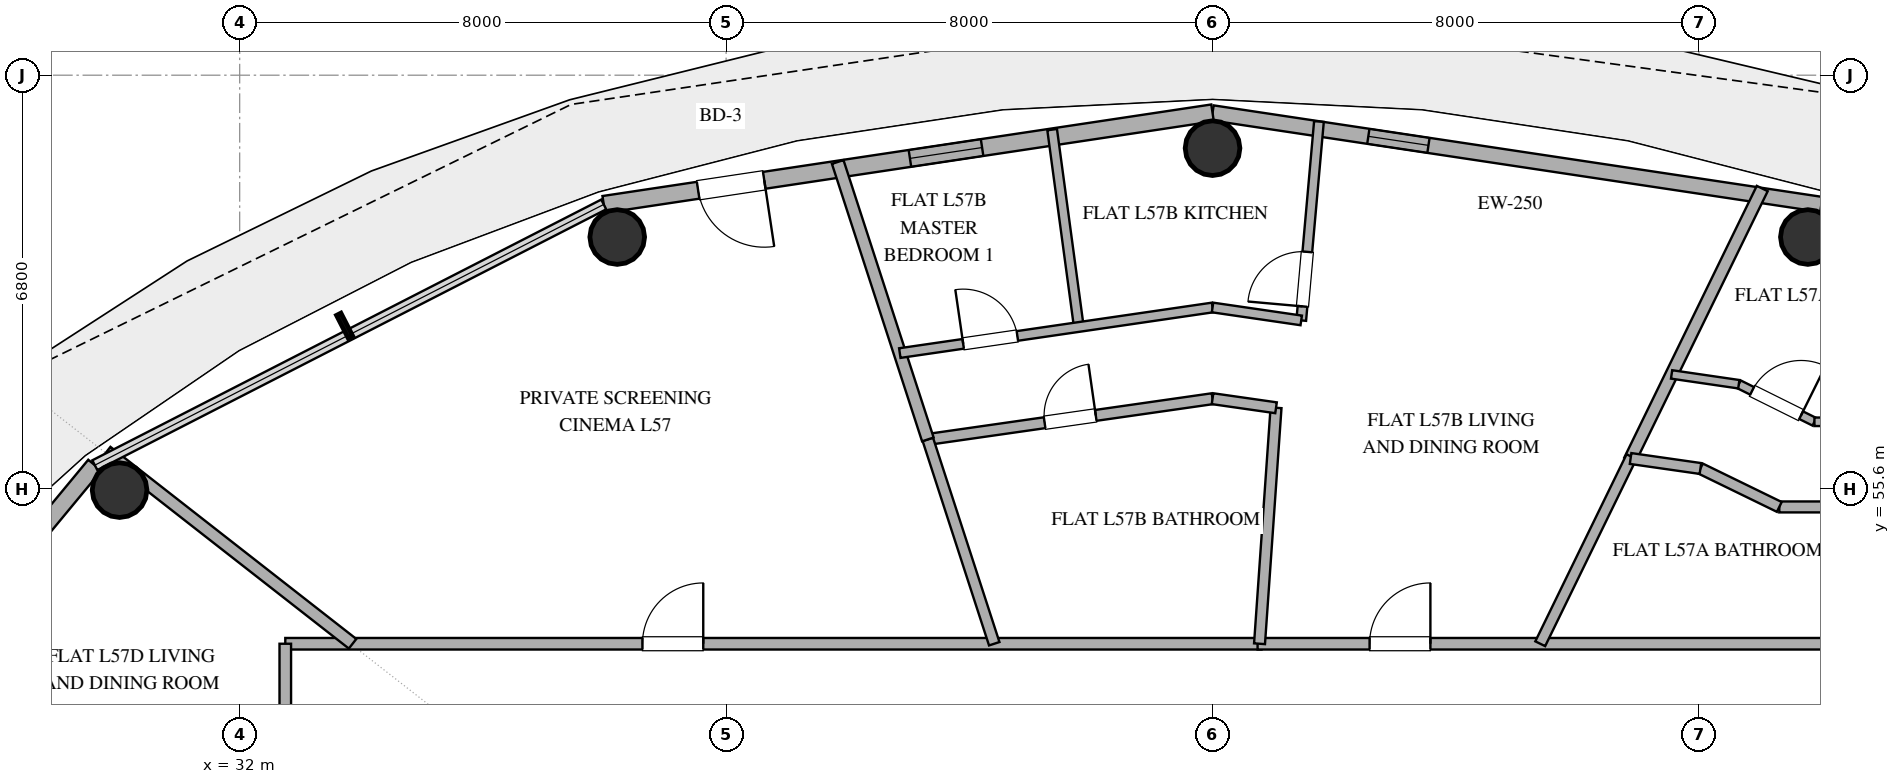
"""IFC4 building model, lengths in metres.
Left out: names, types, materials, properties, quantities, classifications, styles, units other than length and angle.
Written with IfcOpenShell. Run it as: python <this file> out.ifc"""

import sys

from ifc_helpers import new_model, si_unit, direction, frame, frame_2d, origin, origin_2d, place, context, subcontext, project, spatial, rectangle, hollow_circle, extrude, element, fill, save


model = new_model("IFC4")
c1 = context("Model", 3, precision=1e-05, world=origin(), true_north=direction((0.0, 1.0)))
c2 = subcontext(c1, "Body", "Model", "MODEL_VIEW")
j1 = project(units=[si_unit("LENGTHUNIT", "METRE"), si_unit("PLANEANGLEUNIT", "RADIAN")], contexts=[c1])
p1 = place(None, origin())
s1 = spatial("IfcSite", under=j1, at=p1, CompositionType="ELEMENT")
p2 = place(p1, origin())
s2 = spatial("IfcBuilding", under=s1, at=p2, CompositionType="ELEMENT")
p3 = place(p2, frame((0.0, 0.0, 224.4)))
s3 = spatial("IfcBuildingStorey", under=s2, at=p3, CompositionType="ELEMENT", Elevation=224.4)
for number, where, z_axis, x_axis in (
    (1, (57.791, 59.739, 0.0), (0.0, 0.0, 1.0), (1.0, 0.0, 0.0)),
    (2, (48.0, 61.2, 0.0), (0.0, 0.0, 1.0), (1.0, 0.0, 0.0)),
    (3, (38.209, 59.739, 0.0), (0.0, 0.0, 1.0), (1.0, 0.0, 0.0)),
    (4, (30.025, 55.576, 0.0), (0.0, 0.0, 1.0), (1.0, 0.0, 0.0)),
):
    element("IfcColumn", number, at=place(p3, frame(where, z_axis=z_axis, x_axis=x_axis)), inside=s3, PredefinedType="COLUMN", context=c2, shape_type="SweptSolid", body=[
        extrude(hollow_circle(Radius=0.45, WallThickness=0.025, at=origin_2d()), origin(), (0.0, 0.0, 1.0), 3.36),
    ])
p4 = place(p3, frame((66.383, 55.987, 0.0), z_axis=(0.0, 0.0, 1.0), x_axis=(-0.890007394051, 0.455946091699, 0.0)))
e5 = element("IfcWall", 5, at=p4, inside=s3, PredefinedType="SOLIDWALL", context=c2, shape_type="SweptSolid", body=[
    extrude(rectangle(XDim=9.404, YDim=0.28, at=frame_2d((4.702, 0.0))), origin(), (0.0, 0.0, 1.0), 3.36),
])
p5 = place(p4, frame((1.661, 0.0, 0.85)))
e6 = element("IfcOpeningElement", 6, at=p5, cuts=e5, PredefinedType="OPENING", context=c2, shape_type="SweptSolid", body=[
    extrude(rectangle(XDim=1.0, YDim=1.8, at=frame_2d((0.5, 0.9))), frame((0.0, 0.15, 0.0), z_axis=(0.0, -1.0, 0.0), x_axis=(1.0, 0.0, 0.0)), (0.0, 0.0, 1.0), 0.3),
])
p6 = place(p4, frame((3.898, 0.0, 0.85)))
e7 = element("IfcOpeningElement", 7, at=p6, cuts=e5, PredefinedType="OPENING", context=c2, shape_type="SweptSolid", body=[
    extrude(rectangle(XDim=1.35, YDim=1.8, at=frame_2d((0.675, 0.9))), frame((0.0, 0.15, 0.0), z_axis=(0.0, -1.0, 0.0), x_axis=(1.0, 0.0, 0.0)), (0.0, 0.0, 1.0), 0.3),
])
p7 = place(p4, frame((6.578, 0.0, 0.85)))
e8 = element("IfcOpeningElement", 8, at=p7, cuts=e5, PredefinedType="OPENING", context=c2, shape_type="SweptSolid", body=[
    extrude(rectangle(XDim=1.2, YDim=1.8, at=frame_2d((0.6, 0.9))), frame((0.0, 0.15, 0.0), z_axis=(0.0, -1.0, 0.0), x_axis=(1.0, 0.0, 0.0)), (0.0, 0.0, 1.0), 0.3),
])
p8 = place(p3, frame((58.013, 60.274, 0.0), z_axis=(0.0, 0.0, 1.0), x_axis=(-0.988882522213, 0.148698881169, 0.0)))
e9 = element("IfcWall", 9, at=p8, inside=s3, PredefinedType="SOLIDWALL", context=c2, shape_type="SweptSolid", body=[
    extrude(rectangle(XDim=10.125, YDim=0.25, at=frame_2d((5.062, 0.0))), origin(), (0.0, 0.0, 1.0), 3.36),
])
p9 = place(p8, frame((6.534, 0.0, 1.42)))
e10 = element("IfcOpeningElement", 10, at=p9, cuts=e9, PredefinedType="OPENING", context=c2, shape_type="SweptSolid", body=[
    extrude(rectangle(XDim=1.0, YDim=1.05, at=frame_2d((0.5, 0.525))), frame((0.0, 0.135, 0.0), z_axis=(0.0, -1.0, 0.0), x_axis=(1.0, 0.0, 0.0)), (0.0, 0.0, 1.0), 0.27),
])
p10 = place(p3, frame((48.0, 61.78, 0.0), z_axis=(0.0, 0.0, 1.0), x_axis=(-0.988882522213, -0.148698881169, 0.0)))
e11 = element("IfcWall", 11, at=p10, inside=s3, PredefinedType="SOLIDWALL", context=c2, shape_type="SweptSolid", body=[
    extrude(rectangle(XDim=10.125, YDim=0.28, at=frame_2d((5.062, 0.0))), origin(), (0.0, 0.0, 1.0), 3.36),
])
p11 = place(p10, frame((3.833, 0.0, 0.85)))
e12 = element("IfcOpeningElement", 12, at=p11, cuts=e11, PredefinedType="OPENING", context=c2, shape_type="SweptSolid", body=[
    extrude(rectangle(XDim=1.2, YDim=1.8, at=frame_2d((0.6, 0.9))), frame((0.0, 0.15, 0.0), z_axis=(0.0, -1.0, 0.0), x_axis=(1.0, 0.0, 0.0)), (0.0, 0.0, 1.0), 0.3),
])
p12 = place(p10, frame((7.456, 0.0, 0.0)))
e13 = element("IfcOpeningElement", 13, at=p12, cuts=e11, PredefinedType="OPENING", context=c2, shape_type="SweptSolid", body=[
    extrude(rectangle(XDim=1.1, YDim=2.25, at=frame_2d((0.55, 1.125))), frame((0.0, 0.15, 0.0), z_axis=(0.0, -1.0, 0.0), x_axis=(1.0, 0.0, 0.0)), (0.0, 0.0, 1.0), 0.3),
])
p13 = place(p3, frame((29.617, 55.987, 0.0), z_axis=(0.0, 0.0, 1.0), x_axis=(-0.63761509934, -0.770355103243, 0.0)))
e14 = element("IfcWall", 14, at=p13, inside=s3, PredefinedType="SOLIDWALL", context=c2, shape_type="SweptSolid", body=[
    extrude(rectangle(XDim=8.33, YDim=0.28, at=frame_2d((4.165, 0.0))), origin(), (0.0, 0.0, 1.0), 3.36),
])
p14 = place(p13, frame((2.533, 0.0, 0.85)))
e15 = element("IfcOpeningElement", 15, at=p14, cuts=e14, PredefinedType="OPENING", context=c2, shape_type="SweptSolid", body=[
    extrude(rectangle(XDim=2.1, YDim=2.2, at=frame_2d((1.05, 1.1))), frame((0.0, 0.15, 0.0), z_axis=(0.0, -1.0, 0.0), x_axis=(1.0, 0.0, 0.0)), (0.0, 0.0, 1.0), 0.3),
])
p15 = place(p3, frame((32.75, 53.05, 0.0), z_axis=(0.0, 0.0, 1.0), x_axis=(1.0, 0.0, 0.0)))
e16 = element("IfcWall", 16, at=p15, inside=s3, PredefinedType="PARTITIONING", context=c2, shape_type="SweptSolid", body=[
    extrude(rectangle(XDim=16.055, YDim=0.19, at=frame_2d((8.027, 0.0))), origin(), (0.0, 0.0, 1.0), 2.72),
])
p16 = place(p15, frame((5.874, 0.0, 0.0)))
e17 = element("IfcOpeningElement", 17, at=p16, cuts=e16, PredefinedType="OPENING", context=c2, shape_type="SweptSolid", body=[
    extrude(rectangle(XDim=1.0, YDim=2.2, at=frame_2d((0.5, 1.1))), frame((0.0, 0.105, 0.0), z_axis=(0.0, -1.0, 0.0), x_axis=(1.0, 0.0, 0.0)), (0.0, 0.0, 1.0), 0.21),
])
p17 = place(p3, frame((48.74, 53.05, 0.0), z_axis=(0.0, 0.0, 1.0), x_axis=(1.0, 0.0, 0.0)))
e18 = element("IfcWall", 18, at=p17, inside=s3, PredefinedType="PARTITIONING", context=c2, shape_type="SweptSolid", body=[
    extrude(rectangle(XDim=14.51, YDim=0.19, at=frame_2d((7.255, 0.0))), origin(), (0.0, 0.0, 1.0), 2.72),
])
p18 = place(p17, frame((1.842, 0.0, 0.0)))
e19 = element("IfcOpeningElement", 19, at=p18, cuts=e18, PredefinedType="OPENING", context=c2, shape_type="SweptSolid", body=[
    extrude(rectangle(XDim=1.0, YDim=2.2, at=frame_2d((0.5, 1.1))), frame((0.0, 0.105, 0.0), z_axis=(0.0, -1.0, 0.0), x_axis=(1.0, 0.0, 0.0)), (0.0, 0.0, 1.0), 0.21),
])
p19 = place(p3, frame((32.75, 43.356, 0.0), z_axis=(0.0, 0.0, 1.0), x_axis=(0.0, 1.0, 0.0)))
e20 = element("IfcWall", 20, at=p19, inside=s3, PredefinedType="PARTITIONING", context=c2, shape_type="SweptSolid", body=[
    extrude(rectangle(XDim=9.694, YDim=0.19, at=frame_2d((4.847, 0.0))), origin(), (0.0, 0.0, 1.0), 2.72),
])
p20 = place(p19, frame((5.983, 0.0, 0.0)))
e21 = element("IfcOpeningElement", 21, at=p20, cuts=e20, PredefinedType="OPENING", context=c2, shape_type="SweptSolid", body=[
    extrude(rectangle(XDim=1.0, YDim=2.2, at=frame_2d((0.5, 1.1))), frame((0.0, 0.105, 0.0), z_axis=(0.0, -1.0, 0.0), x_axis=(1.0, 0.0, 0.0)), (0.0, 0.0, 1.0), 0.21),
])
p21 = place(p3, frame((29.813, 56.209, 0.0), z_axis=(0.0, 0.0, 1.0), x_axis=(0.788043849094, -0.615619112687, 0.0)))
e22 = element("IfcWall", 22, at=p21, inside=s3, PredefinedType="PARTITIONING", context=c2, shape_type="SweptSolid", body=[
    extrude(rectangle(XDim=5.131, YDim=0.2, at=frame_2d((2.566, 0.0))), origin(), (0.0, 0.0, 1.0), 2.72),
])
p22 = place(p3, frame((43.318, 56.41, 0.0), z_axis=(0.0, 0.0, 1.0), x_axis=(0.989918499483, 0.141638145927, 0.0)))
e23 = element("IfcWall", 23, at=p22, inside=s3, PredefinedType="PLUMBINGWALL", context=c2, shape_type="SweptSolid", body=[
    extrude(rectangle(XDim=4.73, YDim=0.18, at=frame_2d((2.365, 0.0))), origin(), (0.0, 0.0, 1.0), 2.72),
])
p23 = place(p22, frame((1.94, 0.0, 0.0)))
e24 = element("IfcOpeningElement", 24, at=p23, cuts=e23, PredefinedType="OPENING", context=c2, shape_type="SweptSolid", body=[
    extrude(rectangle(XDim=0.85, YDim=2.1, at=frame_2d((0.425, 1.05))), frame((0.0, 0.1, 0.0), z_axis=(0.0, -1.0, 0.0), x_axis=(1.0, 0.0, 0.0)), (0.0, 0.0, 1.0), 0.2),
])
p24 = place(p3, frame((49.044, 56.931, 0.0), z_axis=(0.0, 0.0, 1.0), x_axis=(-0.0697885329, -0.997561807948, 0.0)))
e25 = element("IfcWall", 25, at=p24, inside=s3, PredefinedType="PLUMBINGWALL", context=c2, shape_type="SweptSolid", body=[
    extrude(rectangle(XDim=3.89, YDim=0.18, at=frame_2d((1.945, 0.0))), origin(), (0.0, 0.0, 1.0), 2.72),
])
p25 = place(p3, frame((44.41, 53.05, 0.0), z_axis=(0.0, 0.0, 1.0), x_axis=(-0.309025133622, 0.951053871655, 0.0)))
e26 = element("IfcWall", 26, at=p25, inside=s3, PredefinedType="PLUMBINGWALL", context=c2, shape_type="SweptSolid", body=[
    extrude(rectangle(XDim=3.533, YDim=0.18, at=frame_2d((1.767, 0.0))), origin(), (0.0, 0.0, 1.0), 2.72),
])
p26 = place(p3, frame((57.041, 60.536, 0.0), z_axis=(0.0, 0.0, 1.0), x_axis=(-0.438355931311, -0.898801467224, 0.0)))
e27 = element("IfcWall", 27, at=p26, inside=s3, PredefinedType="PARTITIONING", context=c2, shape_type="SweptSolid", body=[
    extrude(rectangle(XDim=4.974, YDim=0.2, at=frame_2d((2.487, 0.0))), origin(), (0.0, 0.0, 1.0), 2.72),
])
p27 = place(p3, frame((54.89, 56.127, 0.0), z_axis=(0.0, 0.0, 1.0), x_axis=(-0.438347749683, -0.898805457453, 0.0)))
e28 = element("IfcWall", 28, at=p27, inside=s3, PredefinedType="PLUMBINGWALL", context=c2, shape_type="SweptSolid", body=[
    extrude(rectangle(XDim=3.423, YDim=0.18, at=frame_2d((1.711, 0.0))), origin(), (0.0, 0.0, 1.0), 2.72),
])
p28 = place(p3, frame((43.318, 56.41, 0.0), z_axis=(0.0, 0.0, 1.0), x_axis=(-0.309012424199, 0.951058001223, 0.0)))
e29 = element("IfcWall", 29, at=p28, inside=s3, PredefinedType="PARTITIONING", context=c2, shape_type="SweptSolid", body=[
    extrude(rectangle(XDim=4.797, YDim=0.2, at=frame_2d((2.399, 0.0))), origin(), (0.0, 0.0, 1.0), 2.72),
])
p29 = place(p3, frame((49.458, 58.367, 0.0), z_axis=(0.0, 0.0, 1.0), x_axis=(0.088772560689, 0.996051922577, 0.0)))
e30 = element("IfcWall", 30, at=p29, inside=s3, PredefinedType="PLUMBINGWALL", context=c2, shape_type="SweptSolid", body=[
    extrude(rectangle(XDim=3.284, YDim=0.16, at=frame_2d((1.642, 0.0))), origin(), (0.0, 0.0, 1.0), 2.72),
])
p30 = place(p29, frame((0.232, 0.0, 0.0)))
e31 = element("IfcOpeningElement", 31, at=p30, cuts=e30, PredefinedType="OPENING", context=c2, shape_type="SweptSolid", body=[
    extrude(rectangle(XDim=0.9, YDim=2.1, at=frame_2d((0.45, 1.05))), frame((0.0, 0.09, 0.0), z_axis=(0.0, -1.0, 0.0), x_axis=(1.0, 0.0, 0.0)), (0.0, 0.0, 1.0), 0.18),
])
p31 = place(p3, frame((45.801, 58.259, 0.0), z_axis=(0.0, 0.0, 1.0), x_axis=(-0.13403859548, 0.990976112185, 0.0)))
e32 = element("IfcWall", 32, at=p31, inside=s3, PredefinedType="PLUMBINGWALL", context=c2, shape_type="SweptSolid", body=[
    extrude(rectangle(XDim=3.275, YDim=0.16, at=frame_2d((1.637, 0.0))), origin(), (0.0, 0.0, 1.0), 2.72),
])
p32 = place(p3, frame((42.856, 57.83, 0.0), z_axis=(0.0, 0.0, 1.0), x_axis=(0.989542480506, 0.144241739018, 0.0)))
e33 = element("IfcWall", 33, at=p32, inside=s3, PredefinedType="PLUMBINGWALL", context=c2, shape_type="SweptSolid", body=[
    extrude(rectangle(XDim=5.198, YDim=0.16, at=frame_2d((2.599, 0.0))), origin(), (0.0, 0.0, 1.0), 2.72),
])
p33 = place(p32, frame((1.054, 0.0, 0.0)))
e34 = element("IfcOpeningElement", 34, at=p33, cuts=e33, PredefinedType="OPENING", context=c2, shape_type="SweptSolid", body=[
    extrude(rectangle(XDim=0.9, YDim=2.1, at=frame_2d((0.45, 1.05))), frame((0.0, 0.09, 0.0), z_axis=(0.0, -1.0, 0.0), x_axis=(1.0, 0.0, 0.0)), (0.0, 0.0, 1.0), 0.18),
])
p34 = place(p3, frame((57.321, 55.3, 0.0), z_axis=(0.0, 0.0, 1.0), x_axis=(1.0, 0.0, 0.0)))
e35 = element("IfcWall", 35, at=p34, inside=s3, PredefinedType="PLUMBINGWALL", context=c2, shape_type="SweptSolid", body=[
    extrude(rectangle(XDim=1.748, YDim=0.18, at=frame_2d((0.874, 0.0))), origin(), (0.0, 0.0, 1.0), 2.72),
])
p35 = place(p3, frame((48.0, 58.58, 0.0), z_axis=(0.0, 0.0, 1.0), x_axis=(0.989514247961, -0.144435290295, 0.0)))
e36 = element("IfcWall", 36, at=p35, inside=s3, PredefinedType="PLUMBINGWALL", context=c2, shape_type="SweptSolid", body=[
    extrude(rectangle(XDim=1.474, YDim=0.16, at=frame_2d((0.737, 0.0))), origin(), (0.0, 0.0, 1.0), 2.72),
])
p36 = place(p3, frame((56.024, 55.932, 0.0), z_axis=(0.0, 0.0, 1.0), x_axis=(0.898916394035, -0.438120207861, 0.0)))
e37 = element("IfcWall", 37, at=p36, inside=s3, PredefinedType="PLUMBINGWALL", context=c2, shape_type="SweptSolid", body=[
    extrude(rectangle(XDim=1.443, YDim=0.18, at=frame_2d((0.721, 0.0))), origin(), (0.0, 0.0, 1.0), 2.72),
])
p37 = place(p3, frame((56.655, 57.318, 0.0), z_axis=(0.0, 0.0, 1.0), x_axis=(0.895584310315, -0.444891833053, 0.0)))
e38 = element("IfcWall", 38, at=p37, inside=s3, PredefinedType="PARTITIONING", context=c2, shape_type="SweptSolid", body=[
    extrude(rectangle(XDim=1.389, YDim=0.14, at=frame_2d((0.694, 0.0))), origin(), (0.0, 0.0, 1.0), 2.72),
])
p38 = place(p37, frame((0.244, 0.0, 0.0)))
e39 = element("IfcOpeningElement", 39, at=p38, cuts=e38, PredefinedType="OPENING", context=c2, shape_type="SweptSolid", body=[
    extrude(rectangle(XDim=0.9, YDim=2.1, at=frame_2d((0.45, 1.05))), frame((0.0, 0.08, 0.0), z_axis=(0.0, -1.0, 0.0), x_axis=(1.0, 0.0, 0.0)), (0.0, 0.0, 1.0), 0.16),
])
p39 = place(p3, frame((54.875, 56.096, 0.0), z_axis=(0.0, 0.0, 1.0), x_axis=(0.989924230083, -0.141598088596, 0.0)))
e40 = element("IfcWall", 40, at=p39, inside=s3, PredefinedType="PLUMBINGWALL", context=c2, shape_type="SweptSolid", body=[
    extrude(rectangle(XDim=1.16, YDim=0.18, at=frame_2d((0.58, 0.0))), origin(), (0.0, 0.0, 1.0), 2.72),
])
p40 = place(p3, frame((55.55, 57.479, 0.0), z_axis=(0.0, 0.0, 1.0), x_axis=(0.989534281859, -0.144297973051, 0.0)))
e41 = element("IfcWall", 41, at=p40, inside=s3, PredefinedType="PARTITIONING", context=c2, shape_type="SweptSolid", body=[
    extrude(rectangle(XDim=1.117, YDim=0.14, at=frame_2d((0.558, 0.0))), origin(), (0.0, 0.0, 1.0), 2.72),
])
p41 = place(p3, frame((57.899, 56.7, 0.0), z_axis=(0.0, 0.0, 1.0), x_axis=(1.0, 0.0, 0.0)))
e42 = element("IfcWall", 42, at=p41, inside=s3, PredefinedType="PARTITIONING", context=c2, shape_type="SweptSolid", body=[
    extrude(rectangle(XDim=1.065, YDim=0.14, at=frame_2d((0.533, 0.0))), origin(), (0.0, 0.0, 1.0), 2.72),
])
p42 = place(p3, frame((48.0, 57.08, 0.0), z_axis=(0.0, 0.0, 1.0), x_axis=(0.989917064499, -0.141648174766, 0.0)))
e43 = element("IfcWall", 43, at=p42, inside=s3, PredefinedType="PLUMBINGWALL", context=c2, shape_type="SweptSolid", body=[
    extrude(rectangle(XDim=1.055, YDim=0.18, at=frame_2d((0.527, 0.0))), origin(), (0.0, 0.0, 1.0), 2.72),
])
p43 = place(p11, origin())
e44 = element("IfcWindow", 44, at=p43, inside=s3, PartitioningType="SINGLE_PANEL", PredefinedType="WINDOW", context=c2, shape_type="SweptSolid", body=[
    extrude(rectangle(XDim=1.2, YDim=1.8, at=frame_2d((0.6, 0.9))), frame((0.0, 0.03, 0.0), z_axis=(0.0, -1.0, 0.0), x_axis=(1.0, 0.0, 0.0)), (0.0, 0.0, 1.0), 0.06),
])
fill(e12, e44)
p44 = place(p12, origin())
e45 = element("IfcDoor", 45, at=p44, inside=s3, OperationType="SINGLE_SWING_LEFT", PredefinedType="DOOR", context=c2, shape_type="SweptSolid", body=[
    extrude(rectangle(XDim=1.1, YDim=2.25, at=frame_2d((0.55, 1.125))), frame((0.0, 0.025, 0.0), z_axis=(0.0, -1.0, 0.0), x_axis=(1.0, 0.0, 0.0)), (0.0, 0.0, 1.0), 0.05),
])
fill(e13, e45)
p45 = place(p9, origin())
e46 = element("IfcWindow", 46, at=p45, inside=s3, PartitioningType="SINGLE_PANEL", PredefinedType="WINDOW", context=c2, shape_type="SweptSolid", body=[
    extrude(rectangle(XDim=1.0, YDim=1.05, at=frame_2d((0.5, 0.525))), frame((0.0, 0.03, 0.0), z_axis=(0.0, -1.0, 0.0), x_axis=(1.0, 0.0, 0.0)), (0.0, 0.0, 1.0), 0.06),
])
fill(e10, e46)
p46 = place(p16, origin())
e47 = element("IfcDoor", 47, at=p46, inside=s3, OperationType="SINGLE_SWING_RIGHT", PredefinedType="DOOR", context=c2, shape_type="SweptSolid", body=[
    extrude(rectangle(XDim=1.0, YDim=2.2, at=frame_2d((0.5, 1.1))), frame((0.0, 0.025, 0.0), z_axis=(0.0, -1.0, 0.0), x_axis=(1.0, 0.0, 0.0)), (0.0, 0.0, 1.0), 0.05),
])
fill(e17, e47)
p47 = place(p18, origin())
e48 = element("IfcDoor", 48, at=p47, inside=s3, OperationType="SINGLE_SWING_RIGHT", PredefinedType="DOOR", context=c2, shape_type="SweptSolid", body=[
    extrude(rectangle(XDim=1.0, YDim=2.2, at=frame_2d((0.5, 1.1))), frame((0.0, 0.025, 0.0), z_axis=(0.0, -1.0, 0.0), x_axis=(1.0, 0.0, 0.0)), (0.0, 0.0, 1.0), 0.05),
])
fill(e19, e48)
p48 = place(p23, origin())
e49 = element("IfcDoor", 49, at=p48, inside=s3, OperationType="SINGLE_SWING_RIGHT", PredefinedType="DOOR", context=c2, shape_type="SweptSolid", body=[
    extrude(rectangle(XDim=0.85, YDim=2.1, at=frame_2d((0.425, 1.05))), frame((0.0, 0.025, 0.0), z_axis=(0.0, -1.0, 0.0), x_axis=(1.0, 0.0, 0.0)), (0.0, 0.0, 1.0), 0.05),
])
fill(e24, e49)
p49 = place(p30, origin())
e50 = element("IfcDoor", 50, at=p49, inside=s3, OperationType="SINGLE_SWING_LEFT", PredefinedType="DOOR", context=c2, shape_type="SweptSolid", body=[
    extrude(rectangle(XDim=0.9, YDim=2.1, at=frame_2d((0.45, 1.05))), frame((0.0, 0.025, 0.0), z_axis=(0.0, -1.0, 0.0), x_axis=(1.0, 0.0, 0.0)), (0.0, 0.0, 1.0), 0.05),
])
fill(e31, e50)
p50 = place(p33, origin())
e51 = element("IfcDoor", 51, at=p50, inside=s3, OperationType="SINGLE_SWING_LEFT", PredefinedType="DOOR", context=c2, shape_type="SweptSolid", body=[
    extrude(rectangle(XDim=0.9, YDim=2.1, at=frame_2d((0.45, 1.05))), frame((0.0, 0.025, 0.0), z_axis=(0.0, -1.0, 0.0), x_axis=(1.0, 0.0, 0.0)), (0.0, 0.0, 1.0), 0.05),
])
fill(e34, e51)
p51 = place(p38, origin())
e52 = element("IfcDoor", 52, at=p51, inside=s3, OperationType="SINGLE_SWING_RIGHT", PredefinedType="DOOR", context=c2, shape_type="SweptSolid", body=[
    extrude(rectangle(XDim=0.9, YDim=2.1, at=frame_2d((0.45, 1.05))), frame((0.0, 0.025, 0.0), z_axis=(0.0, -1.0, 0.0), x_axis=(1.0, 0.0, 0.0)), (0.0, 0.0, 1.0), 0.05),
])
fill(e39, e52)
save(model, sys.argv[1])
